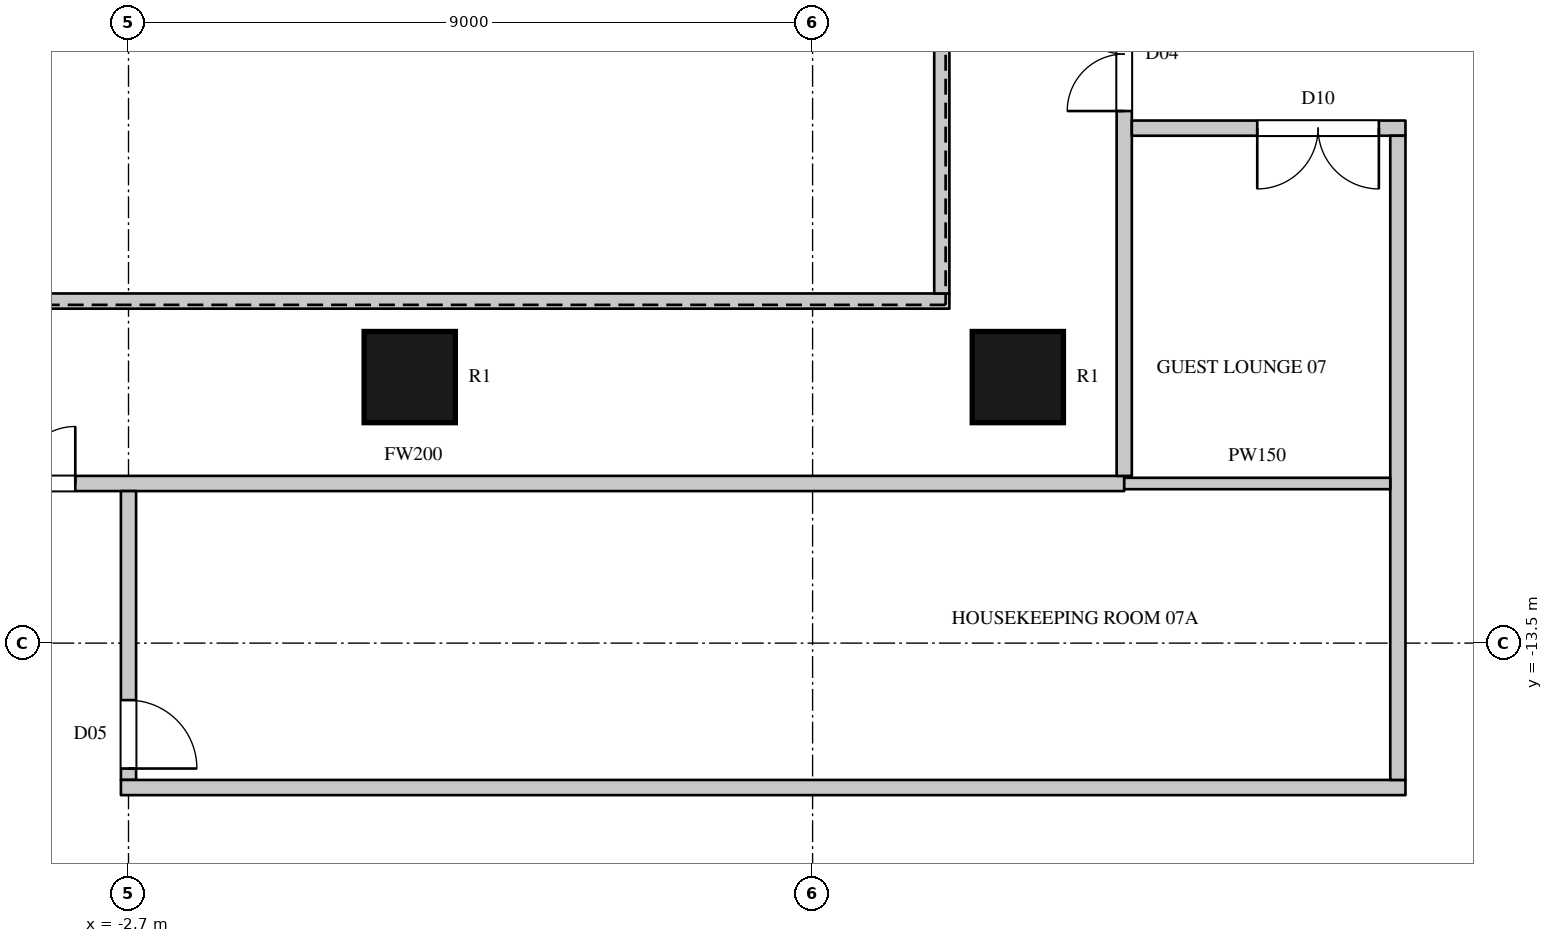
"""IFC4 building model, lengths in metres.
Left out: names, types, materials, properties, quantities, classifications, styles, units other than length and angle.
Written with IfcOpenShell. Run it as: python <this file> out.ifc"""

import sys

from ifc_helpers import new_model, si_unit, direction, frame, frame_2d, origin, origin_2d, place, context, subcontext, project, spatial, rectangle, circle, extrude, element, fill, save


model = new_model("IFC4")
c1 = context("Model", 3, precision=1e-05, world=origin(), true_north=direction((0.0, 1.0)))
c2 = subcontext(c1, "Body", "Model", "MODEL_VIEW")
j1 = project(units=[si_unit("LENGTHUNIT", "METRE"), si_unit("PLANEANGLEUNIT", "RADIAN")], contexts=[c1])
p1 = place(None, origin())
s1 = spatial("IfcSite", under=j1, at=p1, CompositionType="ELEMENT")
p2 = place(p1, origin())
s2 = spatial("IfcBuilding", under=s1, at=p2, CompositionType="ELEMENT")
p3 = place(p2, frame((0.0, 0.0, 55.5)))
s3 = spatial("IfcBuildingStorey", under=s2, at=p3, CompositionType="ELEMENT", Elevation=55.5)
for number, where, z_axis, x_axis in (
    (1, (1.0, -10.0, 0.0), (0.0, 0.0, 1.0), (1.0, 0.0, 0.0)),
    (2, (9.0, -10.0, 0.0), (0.0, 0.0, 1.0), (1.0, 0.0, 0.0)),
):
    element("IfcColumn", number, at=place(p3, frame(where, z_axis=z_axis, x_axis=x_axis)), inside=s3, PredefinedType="COLUMN", context=c2, shape_type="SweptSolid", body=[
        extrude(circle(Radius=0.6, at=origin_2d()), origin(), (0.0, 0.0, 1.0), 3.6),
    ])
p4 = place(p3, frame((-8.3, -11.4, 0.0), z_axis=(0.0, 0.0, 1.0), x_axis=(1.0, 0.0, 0.0)))
e3 = element("IfcWall", 3, at=p4, inside=s3, PredefinedType="PARTITIONING", context=c2, shape_type="SweptSolid", body=[
    extrude(rectangle(XDim=18.7, YDim=0.2, at=frame_2d((9.35, 0.0))), origin(), (0.0, 0.0, 1.0), 3.3),
])
p5 = place(p4, frame((3.4, 0.0, 0.0)))
e4 = element("IfcOpeningElement", 4, at=p5, cuts=e3, PredefinedType="OPENING", context=c2, shape_type="SweptSolid", body=[
    extrude(rectangle(XDim=1.5, YDim=2.2, at=frame_2d((0.75, 1.1))), frame((0.0, 0.11, 0.0), z_axis=(0.0, -1.0, 0.0), x_axis=(1.0, 0.0, 0.0)), (0.0, 0.0, 1.0), 0.22),
])
p6 = place(p3, frame((-6.1, -9.0, 0.0), z_axis=(0.0, 0.0, 1.0), x_axis=(1.0, 0.0, 0.0)))
e5 = element("IfcWall", 5, at=p6, inside=s3, PredefinedType="PARTITIONING", context=c2, shape_type="SweptSolid", body=[
    extrude(rectangle(XDim=14.2, YDim=0.2, at=frame_2d((7.1, 0.0))), origin(), (0.0, 0.0, 1.0), 3.3),
])
p7 = place(p3, frame((-2.7, -15.3, 0.0), z_axis=(0.0, 0.0, 1.0), x_axis=(0.0, 1.0, 0.0)))
e6 = element("IfcWall", 6, at=p7, inside=s3, PredefinedType="PARTITIONING", context=c2, shape_type="SweptSolid", body=[
    extrude(rectangle(XDim=3.8, YDim=0.2, at=frame_2d((1.9, 0.0))), origin(), (0.0, 0.0, 1.0), 2.75),
])
p8 = place(p7, frame((0.15, 0.0, 0.0)))
e7 = element("IfcOpeningElement", 7, at=p8, cuts=e6, PredefinedType="OPENING", context=c2, shape_type="SweptSolid", body=[
    extrude(rectangle(XDim=0.9, YDim=2.2, at=frame_2d((0.45, 1.1))), frame((0.0, 0.11, 0.0), z_axis=(0.0, -1.0, 0.0), x_axis=(1.0, 0.0, 0.0)), (0.0, 0.0, 1.0), 0.22),
])
p9 = place(p3, frame((-2.8, -15.4, 0.0), z_axis=(0.0, 0.0, 1.0), x_axis=(1.0, 0.0, 0.0)))
e8 = element("IfcWall", 8, at=p9, inside=s3, PredefinedType="PARTITIONING", context=c2, shape_type="SweptSolid", body=[
    extrude(rectangle(XDim=16.9, YDim=0.2, at=frame_2d((8.45, 0.0))), origin(), (0.0, 0.0, 1.0), 3.3),
])
p10 = place(p3, frame((8.0, -8.9, 0.0), z_axis=(0.0, 0.0, 1.0), x_axis=(0.0, 1.0, 0.0)))
e9 = element("IfcWall", 9, at=p10, inside=s3, PredefinedType="PARTITIONING", context=c2, shape_type="SweptSolid", body=[
    extrude(rectangle(XDim=17.8, YDim=0.2, at=frame_2d((8.9, 0.0))), origin(), (0.0, 0.0, 1.0), 3.3),
])
p11 = place(p3, frame((10.4, -11.3, 0.0), z_axis=(0.0, 0.0, 1.0), x_axis=(0.0, 1.0, 0.0)))
e10 = element("IfcWall", 10, at=p11, inside=s3, PredefinedType="PARTITIONING", context=c2, shape_type="SweptSolid", body=[
    extrude(rectangle(XDim=22.6, YDim=0.2, at=frame_2d((11.3, 0.0))), origin(), (0.0, 0.0, 1.0), 3.3),
])
p12 = place(p11, frame((4.8, 0.0, 0.0)))
e11 = element("IfcOpeningElement", 11, at=p12, cuts=e10, PredefinedType="OPENING", context=c2, shape_type="SweptSolid", body=[
    extrude(rectangle(XDim=1.5, YDim=2.2, at=frame_2d((0.75, 1.1))), frame((0.0, 0.11, 0.0), z_axis=(0.0, -1.0, 0.0), x_axis=(1.0, 0.0, 0.0)), (0.0, 0.0, 1.0), 0.22),
])
p13 = place(p11, frame((16.3, 0.0, 0.0)))
e12 = element("IfcOpeningElement", 12, at=p13, cuts=e10, PredefinedType="OPENING", context=c2, shape_type="SweptSolid", body=[
    extrude(rectangle(XDim=1.5, YDim=2.2, at=frame_2d((0.75, 1.1))), frame((0.0, 0.11, 0.0), z_axis=(0.0, -1.0, 0.0), x_axis=(1.0, 0.0, 0.0)), (0.0, 0.0, 1.0), 0.22),
])
p14 = place(p11, frame((11.95, 0.0, 0.0)))
e13 = element("IfcOpeningElement", 13, at=p14, cuts=e10, PredefinedType="OPENING", context=c2, shape_type="SweptSolid", body=[
    extrude(rectangle(XDim=1.5, YDim=2.2, at=frame_2d((0.75, 1.1))), frame((0.0, 0.11, 0.0), z_axis=(0.0, -1.0, 0.0), x_axis=(1.0, 0.0, 0.0)), (0.0, 0.0, 1.0), 0.22),
])
p15 = place(p3, frame((10.5, -6.725, 0.0), z_axis=(0.0, 0.0, 1.0), x_axis=(1.0, 0.0, 0.0)))
e14 = element("IfcWall", 14, at=p15, inside=s3, PredefinedType="PARTITIONING", context=c2, shape_type="SweptSolid", body=[
    extrude(rectangle(XDim=3.6, YDim=0.2, at=frame_2d((1.8, 0.0))), origin(), (0.0, 0.0, 1.0), 3.3),
])
p16 = place(p15, frame((1.65, 0.0, 0.0)))
e15 = element("IfcOpeningElement", 15, at=p16, cuts=e14, PredefinedType="OPENING", context=c2, shape_type="SweptSolid", body=[
    extrude(rectangle(XDim=1.6, YDim=2.4, at=frame_2d((0.8, 1.2))), frame((0.0, 0.11, 0.0), z_axis=(0.0, -1.0, 0.0), x_axis=(1.0, 0.0, 0.0)), (0.0, 0.0, 1.0), 0.22),
])
p17 = place(p3, frame((14.0, -15.3, 0.0), z_axis=(0.0, 0.0, 1.0), x_axis=(0.0, 1.0, 0.0)))
e16 = element("IfcWall", 16, at=p17, inside=s3, PredefinedType="PARTITIONING", context=c2, shape_type="SweptSolid", body=[
    extrude(rectangle(XDim=8.475, YDim=0.2, at=frame_2d((4.238, 0.0))), origin(), (0.0, 0.0, 1.0), 3.3),
])
p18 = place(p3, frame((10.4, -11.4, 0.0), z_axis=(0.0, 0.0, 1.0), x_axis=(1.0, 0.0, 0.0)))
e17 = element("IfcWall", 17, at=p18, inside=s3, PredefinedType="PARTITIONING", context=c2, shape_type="SweptSolid", body=[
    extrude(rectangle(XDim=3.5, YDim=0.15, at=frame_2d((1.75, 0.0))), origin(), (0.0, 0.0, 1.0), 3.3),
])
p19 = place(p5, origin())
e18 = element("IfcDoor", 18, at=p19, inside=s3, OperationType="DOUBLE_DOOR_SINGLE_SWING", PredefinedType="DOOR", context=c2, shape_type="SweptSolid", body=[
    extrude(rectangle(XDim=1.5, YDim=2.2, at=frame_2d((0.75, 1.1))), frame((0.0, 0.025, 0.0), z_axis=(0.0, -1.0, 0.0), x_axis=(1.0, 0.0, 0.0)), (0.0, 0.0, 1.0), 0.05),
])
fill(e4, e18)
p20 = place(p12, origin())
e19 = element("IfcDoor", 19, at=p20, inside=s3, OperationType="DOUBLE_DOOR_SINGLE_SWING", PredefinedType="DOOR", context=c2, shape_type="SweptSolid", body=[
    extrude(rectangle(XDim=1.5, YDim=2.2, at=frame_2d((0.75, 1.1))), frame((0.0, 0.025, 0.0), z_axis=(0.0, -1.0, 0.0), x_axis=(1.0, 0.0, 0.0)), (0.0, 0.0, 1.0), 0.05),
])
fill(e11, e19)
p21 = place(p8, origin())
e20 = element("IfcDoor", 20, at=p21, inside=s3, OperationType="SINGLE_SWING_RIGHT", PredefinedType="DOOR", context=c2, shape_type="SweptSolid", body=[
    extrude(rectangle(XDim=0.9, YDim=2.2, at=frame_2d((0.45, 1.1))), frame((0.0, 0.025, 0.0), z_axis=(0.0, -1.0, 0.0), x_axis=(1.0, 0.0, 0.0)), (0.0, 0.0, 1.0), 0.05),
])
fill(e7, e20)
p22 = place(p16, origin())
e21 = element("IfcDoor", 21, at=p22, inside=s3, OperationType="DOUBLE_DOOR_SINGLE_SWING", PredefinedType="DOOR", context=c2, shape_type="SweptSolid", body=[
    extrude(rectangle(XDim=1.6, YDim=2.4, at=frame_2d((0.8, 1.2))), frame((0.0, 0.025, 0.0), z_axis=(0.0, -1.0, 0.0), x_axis=(1.0, 0.0, 0.0)), (0.0, 0.0, 1.0), 0.05),
])
fill(e15, e21)
save(model, sys.argv[1])
